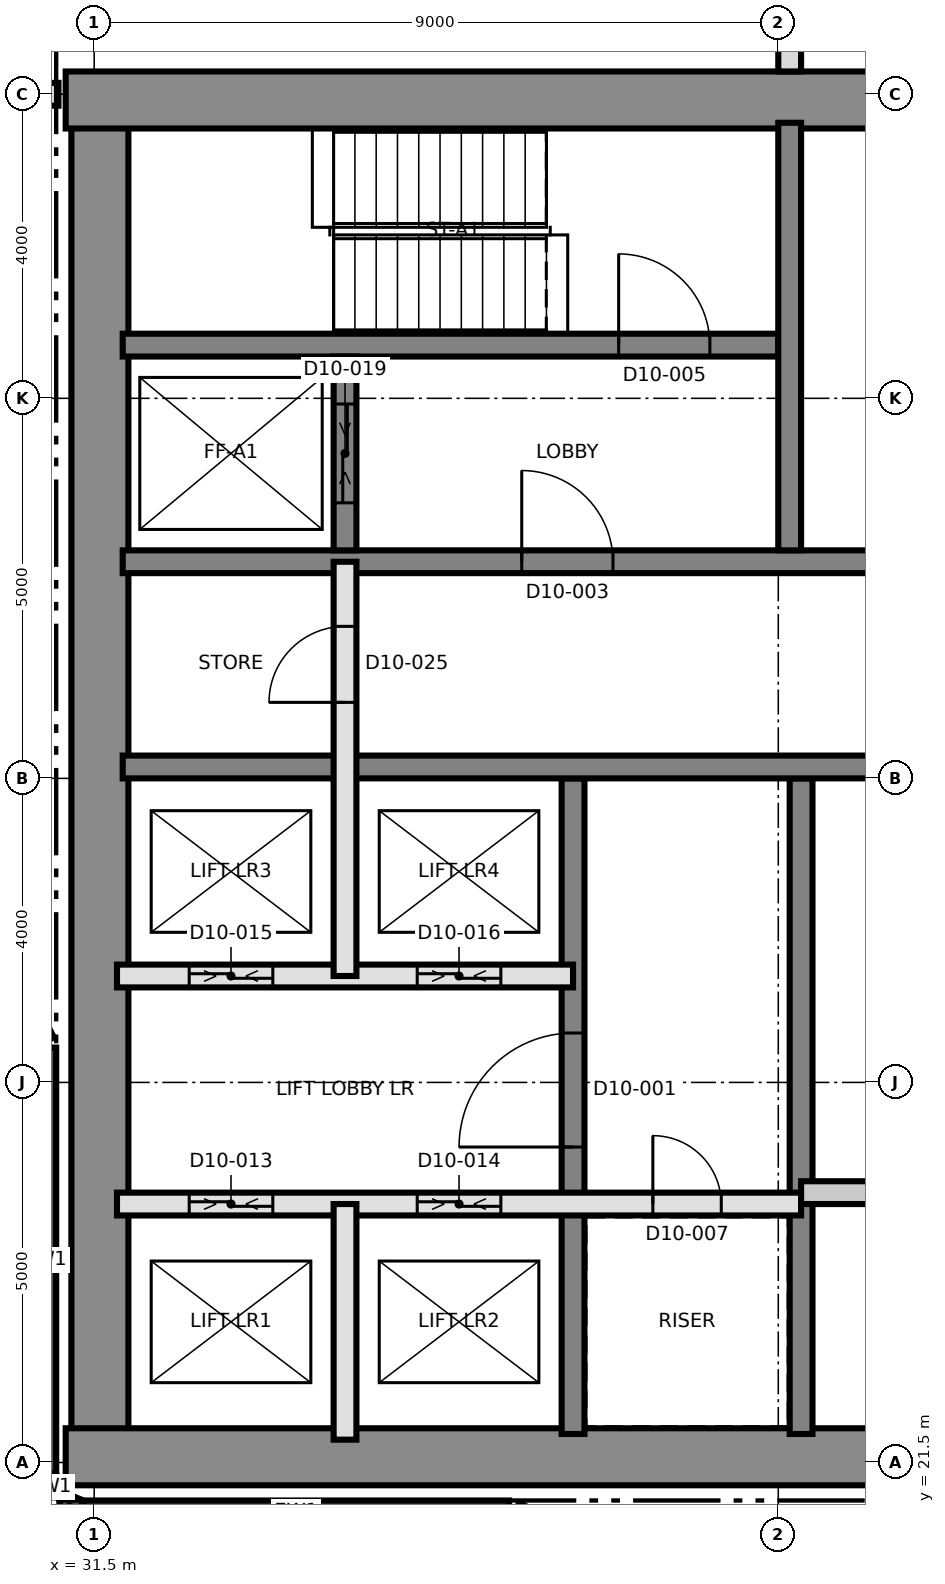
"""IFC4 building model, lengths in metres.
Left out: names, types, materials, properties, quantities, classifications, styles, units other than length and angle.
Written with IfcOpenShell. Run it as: python <this file> out.ifc"""

import sys

from ifc_helpers import new_model, si_unit, direction, frame, frame_2d, origin, place, context, subcontext, project, spatial, rectangle, extrude, element, fill, save


model = new_model("IFC4")
c1 = context("Model", 3, precision=1e-05, world=origin(), true_north=direction((0.0, 1.0)))
c2 = subcontext(c1, "Body", "Model", "MODEL_VIEW")
j1 = project(units=[si_unit("LENGTHUNIT", "METRE"), si_unit("PLANEANGLEUNIT", "RADIAN")], contexts=[c1])
p1 = place(None, origin())
s1 = spatial("IfcSite", under=j1, at=p1, CompositionType="ELEMENT")
p2 = place(p1, origin())
s2 = spatial("IfcBuilding", under=s1, at=p2, CompositionType="ELEMENT")
p3 = place(p2, frame((0.0, 0.0, 116.7)))
s3 = spatial("IfcBuildingStorey", under=s2, at=p3, CompositionType="ELEMENT", Elevation=116.7)
p4 = place(p3, frame((31.575, 21.875, 0.0), z_axis=(0.0, 0.0, 1.0), x_axis=(0.0, 1.0, 0.0)))
e1 = element("IfcWall", 1, at=p4, inside=s3, PredefinedType="SHEAR", context=c2, shape_type="SweptSolid", body=[
    extrude(rectangle(XDim=17.25, YDim=0.75, at=frame_2d((8.625, 0.0))), origin(), (0.0, 0.0, 1.0), 3.7),
])
p5 = place(p3, frame((31.125, 21.575, 0.0), z_axis=(0.0, 0.0, 1.0), x_axis=(1.0, 0.0, 0.0)))
e2 = element("IfcWall", 2, at=p5, inside=s3, PredefinedType="SHEAR", context=c2, shape_type="SweptSolid", body=[
    extrude(rectangle(XDim=27.0, YDim=0.75, at=frame_2d((13.5, 0.0))), origin(), (0.0, 0.0, 1.0), 3.7),
])
p6 = place(p3, frame((31.125, 39.425, 0.0), z_axis=(0.0, 0.0, 1.0), x_axis=(1.0, 0.0, 0.0)))
e3 = element("IfcWall", 3, at=p6, inside=s3, PredefinedType="SHEAR", context=c2, shape_type="SweptSolid", body=[
    extrude(rectangle(XDim=27.0, YDim=0.75, at=frame_2d((13.5, 0.0))), origin(), (0.0, 0.0, 1.0), 3.7),
])
p7 = place(p6, frame((10.575, 0.0, 0.0)))
e4 = element("IfcOpeningElement", 4, at=p7, cuts=e3, PredefinedType="OPENING", context=c2, shape_type="SweptSolid", body=[
    extrude(rectangle(XDim=1.2, YDim=2.1, at=frame_2d((0.6, 1.05))), frame((0.0, 0.385, 0.0), z_axis=(0.0, -1.0, 0.0), x_axis=(1.0, 0.0, 0.0)), (0.0, 0.0, 1.0), 0.77),
])
p8 = place(p3, frame((37.8, 21.875, 0.0), z_axis=(0.0, 0.0, 1.0), x_axis=(0.0, 1.0, 0.0)))
e5 = element("IfcWall", 5, at=p8, inside=s3, PredefinedType="SHEAR", context=c2, shape_type="SweptSolid", body=[
    extrude(rectangle(XDim=8.625, YDim=0.3, at=frame_2d((4.312, 0.0))), origin(), (0.0, 0.0, 1.0), 3.7),
])
p9 = place(p8, frame((3.775, 0.0, 0.0)))
e6 = element("IfcOpeningElement", 6, at=p9, cuts=e5, PredefinedType="OPENING", context=c2, shape_type="SweptSolid", body=[
    extrude(rectangle(XDim=1.5, YDim=2.1, at=frame_2d((0.75, 1.05))), frame((0.0, 0.16, 0.0), z_axis=(0.0, -1.0, 0.0), x_axis=(1.0, 0.0, 0.0)), (0.0, 0.0, 1.0), 0.32),
])
p10 = place(p3, frame((40.8, 21.875, 0.0), z_axis=(0.0, 0.0, 1.0), x_axis=(0.0, 1.0, 0.0)))
e7 = element("IfcWall", 7, at=p10, inside=s3, PredefinedType="SHEAR", context=c2, shape_type="SweptSolid", body=[
    extrude(rectangle(XDim=8.625, YDim=0.3, at=frame_2d((4.312, 0.0))), origin(), (0.0, 0.0, 1.0), 3.7),
])
p11 = place(p3, frame((31.875, 30.65, 0.0), z_axis=(0.0, 0.0, 1.0), x_axis=(1.0, 0.0, 0.0)))
e8 = element("IfcWall", 8, at=p11, inside=s3, PredefinedType="SHEAR", context=c2, shape_type="SweptSolid", body=[
    extrude(rectangle(XDim=26.25, YDim=0.3, at=frame_2d((13.125, 0.0))), origin(), (0.0, 0.0, 1.0), 3.7),
])
p12 = place(p11, frame((24.625, 0.0, 0.0)))
e9 = element("IfcOpeningElement", 9, at=p12, cuts=e8, PredefinedType="OPENING", context=c2, shape_type="SweptSolid", body=[
    extrude(rectangle(XDim=1.0, YDim=2.1, at=frame_2d((0.5, 1.05))), frame((0.0, 0.16, 0.0), z_axis=(0.0, -1.0, 0.0), x_axis=(1.0, 0.0, 0.0)), (0.0, 0.0, 1.0), 0.32),
])
p13 = place(p11, frame((11.425, 0.0, 0.0)))
e10 = element("IfcOpeningElement", 10, at=p13, cuts=e8, PredefinedType="OPENING", context=c2, shape_type="SweptSolid", body=[
    extrude(rectangle(XDim=1.0, YDim=2.1, at=frame_2d((0.5, 1.05))), frame((0.0, 0.16, 0.0), z_axis=(0.0, -1.0, 0.0), x_axis=(1.0, 0.0, 0.0)), (0.0, 0.0, 1.0), 0.32),
])
p14 = place(p3, frame((31.875, 33.35, 0.0), z_axis=(0.0, 0.0, 1.0), x_axis=(1.0, 0.0, 0.0)))
e11 = element("IfcWall", 11, at=p14, inside=s3, PredefinedType="SHEAR", context=c2, shape_type="SweptSolid", body=[
    extrude(rectangle(XDim=26.25, YDim=0.3, at=frame_2d((13.125, 0.0))), origin(), (0.0, 0.0, 1.0), 3.7),
])
p15 = place(p14, frame((13.775, 0.0, 0.0)))
e12 = element("IfcOpeningElement", 12, at=p15, cuts=e11, PredefinedType="OPENING", context=c2, shape_type="SweptSolid", body=[
    extrude(rectangle(XDim=1.4, YDim=2.1, at=frame_2d((0.7, 1.05))), frame((0.0, 0.16, 0.0), z_axis=(0.0, -1.0, 0.0), x_axis=(1.0, 0.0, 0.0)), (0.0, 0.0, 1.0), 0.32),
])
p16 = place(p14, frame((5.25, 0.0, 0.0)))
e13 = element("IfcOpeningElement", 13, at=p16, cuts=e11, PredefinedType="OPENING", context=c2, shape_type="SweptSolid", body=[
    extrude(rectangle(XDim=1.2, YDim=2.1, at=frame_2d((0.6, 1.05))), frame((0.0, 0.16, 0.0), z_axis=(0.0, -1.0, 0.0), x_axis=(1.0, 0.0, 0.0)), (0.0, 0.0, 1.0), 0.32),
])
p17 = place(p14, frame((19.8, 0.0, 0.0)))
e14 = element("IfcOpeningElement", 14, at=p17, cuts=e11, PredefinedType="OPENING", context=c2, shape_type="SweptSolid", body=[
    extrude(rectangle(XDim=1.2, YDim=2.1, at=frame_2d((0.6, 1.05))), frame((0.0, 0.16, 0.0), z_axis=(0.0, -1.0, 0.0), x_axis=(1.0, 0.0, 0.0)), (0.0, 0.0, 1.0), 0.32),
])
p18 = place(p3, frame((31.875, 36.2, 0.0), z_axis=(0.0, 0.0, 1.0), x_axis=(1.0, 0.0, 0.0)))
e15 = element("IfcWall", 15, at=p18, inside=s3, PredefinedType="SHEAR", context=c2, shape_type="SweptSolid", body=[
    extrude(rectangle(XDim=8.625, YDim=0.3, at=frame_2d((4.312, 0.0))), origin(), (0.0, 0.0, 1.0), 3.7),
])
p19 = place(p18, frame((6.525, 0.0, 0.0)))
e16 = element("IfcOpeningElement", 16, at=p19, cuts=e15, PredefinedType="OPENING", context=c2, shape_type="SweptSolid", body=[
    extrude(rectangle(XDim=1.2, YDim=2.1, at=frame_2d((0.6, 1.05))), frame((0.0, 0.16, 0.0), z_axis=(0.0, -1.0, 0.0), x_axis=(1.0, 0.0, 0.0)), (0.0, 0.0, 1.0), 0.32),
])
p20 = place(p3, frame((40.65, 33.5, 0.0), z_axis=(0.0, 0.0, 1.0), x_axis=(0.0, 1.0, 0.0)))
e17 = element("IfcWall", 17, at=p20, inside=s3, PredefinedType="SHEAR", context=c2, shape_type="SweptSolid", body=[
    extrude(rectangle(XDim=5.625, YDim=0.3, at=frame_2d((2.812, 0.0))), origin(), (0.0, 0.0, 1.0), 3.7),
])
p21 = place(p3, frame((34.8, 33.5, 0.0), z_axis=(0.0, 0.0, 1.0), x_axis=(0.0, 1.0, 0.0)))
e18 = element("IfcWall", 18, at=p21, inside=s3, PredefinedType="SHEAR", context=c2, shape_type="SweptSolid", body=[
    extrude(rectangle(XDim=2.55, YDim=0.3, at=frame_2d((1.275, 0.0))), origin(), (0.0, 0.0, 1.0), 3.7),
])
p22 = place(p21, frame((0.625, 0.0, 0.0)))
e19 = element("IfcOpeningElement", 19, at=p22, cuts=e18, PredefinedType="OPENING", context=c2, shape_type="SweptSolid", body=[
    extrude(rectangle(XDim=1.3, YDim=2.4, at=frame_2d((0.65, 1.2))), frame((0.0, 0.16, 0.0), z_axis=(0.0, -1.0, 0.0), x_axis=(1.0, 0.0, 0.0)), (0.0, 0.0, 1.0), 0.32),
])
p23 = place(p3, frame((30.85, 26.959, 0.0), z_axis=(0.0, 0.0, 1.0), x_axis=(0.0, -1.0, 0.0)))
e20 = element("IfcWall", 20, at=p23, inside=s3, PredefinedType="SOLIDWALL", context=c2, shape_type="SweptSolid", body=[
    extrude(rectangle(XDim=5.599, YDim=0.3, at=frame_2d((2.8, 0.0))), origin(), (0.0, 0.0, 1.0), 3.4),
])
for number, where, z_axis, x_axis in (
    (21, (30.861, 21.302, 0.0), (0.0, 0.0, 1.0), (0.383, -0.924, 0.0)),
    (22, (31.048, 20.967, 0.0), (0.0, 0.0, 1.0), (0.924, -0.383, 0.0)),
):
    element("IfcWall", number, at=place(p3, frame(where, z_axis=z_axis, x_axis=x_axis)), inside=s3, PredefinedType="SOLIDWALL", context=c2, shape_type="SweptSolid", body=[
        extrude(rectangle(XDim=0.275, YDim=0.3, at=frame_2d((0.138, 0.0))), origin(), (0.0, 0.0, 1.0), 3.4),
    ])
p24 = place(p3, frame((31.36, 20.85, 0.0), z_axis=(0.0, 0.0, 1.0), x_axis=(1.0, 0.0, 0.0)))
e23 = element("IfcWall", 23, at=p24, inside=s3, PredefinedType="SOLIDWALL", context=c2, shape_type="SweptSolid", body=[
    extrude(rectangle(XDim=5.599, YDim=0.3, at=frame_2d((2.8, 0.0))), origin(), (0.0, 0.0, 1.0), 3.4),
])
for number, where, z_axis, x_axis in (
    (24, (37.025, 20.834, 0.0), (0.0, 0.0, 1.0), (0.897, -0.442, 0.0)),
    (25, (30.216, 28.28, 0.0), (0.0, 0.0, 1.0), (0.442, -0.897, 0.0)),
):
    element("IfcWall", number, at=place(p3, frame(where, z_axis=z_axis, x_axis=x_axis)), inside=s3, PredefinedType="SOLIDWALL", context=c2, shape_type="SweptSolid", body=[
        extrude(rectangle(XDim=1.399, YDim=0.3, at=frame_2d((0.7, 0.0))), origin(), (0.0, 0.0, 1.0), 3.4),
    ])
p25 = place(p3, frame((31.8, 24.9, 0.0), z_axis=(0.0, 0.0, 1.0), x_axis=(1.0, 0.0, 0.0)))
e26 = element("IfcWall", 26, at=p25, inside=s3, PredefinedType="SOLIDWALL", context=c2, shape_type="SweptSolid", body=[
    extrude(rectangle(XDim=9.0, YDim=0.3, at=frame_2d((4.5, 0.0))), origin(), (0.0, 0.0, 1.0), 3.4),
])
p26 = place(p25, frame((7.05, 0.0, 0.0)))
e27 = element("IfcOpeningElement", 27, at=p26, cuts=e26, PredefinedType="OPENING", context=c2, shape_type="SweptSolid", body=[
    extrude(rectangle(XDim=0.9, YDim=2.1, at=frame_2d((0.45, 1.05))), frame((0.0, 0.16, 0.0), z_axis=(0.0, -1.0, 0.0), x_axis=(1.0, 0.0, 0.0)), (0.0, 0.0, 1.0), 0.32),
])
p27 = place(p25, frame((0.95, 0.0, 0.0)))
e28 = element("IfcOpeningElement", 28, at=p27, cuts=e26, PredefinedType="OPENING", context=c2, shape_type="SweptSolid", body=[
    extrude(rectangle(XDim=1.1, YDim=2.4, at=frame_2d((0.55, 1.2))), frame((0.0, 0.16, 0.0), z_axis=(0.0, -1.0, 0.0), x_axis=(1.0, 0.0, 0.0)), (0.0, 0.0, 1.0), 0.32),
])
p28 = place(p25, frame((3.95, 0.0, 0.0)))
e29 = element("IfcOpeningElement", 29, at=p28, cuts=e26, PredefinedType="OPENING", context=c2, shape_type="SweptSolid", body=[
    extrude(rectangle(XDim=1.1, YDim=2.4, at=frame_2d((0.55, 1.2))), frame((0.0, 0.16, 0.0), z_axis=(0.0, -1.0, 0.0), x_axis=(1.0, 0.0, 0.0)), (0.0, 0.0, 1.0), 0.32),
])
p29 = place(p3, frame((40.8, 25.05, 0.0), z_axis=(0.0, 0.0, 1.0), x_axis=(1.0, 0.0, 0.0)))
e30 = element("IfcWall", 30, at=p29, inside=s3, PredefinedType="PARTITIONING", context=c2, shape_type="SweptSolid", body=[
    extrude(rectangle(XDim=6.0, YDim=0.3, at=frame_2d((3.0, 0.0))), origin(), (0.0, 0.0, 1.0), 3.4),
])
p30 = place(p29, frame((2.5, 0.0, 0.0)))
e31 = element("IfcOpeningElement", 31, at=p30, cuts=e30, PredefinedType="OPENING", context=c2, shape_type="SweptSolid", body=[
    extrude(rectangle(XDim=1.0, YDim=2.1, at=frame_2d((0.5, 1.05))), frame((0.0, 0.16, 0.0), z_axis=(0.0, -1.0, 0.0), x_axis=(1.0, 0.0, 0.0)), (0.0, 0.0, 1.0), 0.32),
])
p31 = place(p3, frame((31.8, 27.9, 0.0), z_axis=(0.0, 0.0, 1.0), x_axis=(1.0, 0.0, 0.0)))
e32 = element("IfcWall", 32, at=p31, inside=s3, PredefinedType="SOLIDWALL", context=c2, shape_type="SweptSolid", body=[
    extrude(rectangle(XDim=6.0, YDim=0.3, at=frame_2d((3.0, 0.0))), origin(), (0.0, 0.0, 1.0), 3.4),
])
p32 = place(p31, frame((0.95, 0.0, 0.0)))
e33 = element("IfcOpeningElement", 33, at=p32, cuts=e32, PredefinedType="OPENING", context=c2, shape_type="SweptSolid", body=[
    extrude(rectangle(XDim=1.1, YDim=2.4, at=frame_2d((0.55, 1.2))), frame((0.0, 0.16, 0.0), z_axis=(0.0, -1.0, 0.0), x_axis=(1.0, 0.0, 0.0)), (0.0, 0.0, 1.0), 0.32),
])
p33 = place(p31, frame((3.95, 0.0, 0.0)))
e34 = element("IfcOpeningElement", 34, at=p33, cuts=e32, PredefinedType="OPENING", context=c2, shape_type="SweptSolid", body=[
    extrude(rectangle(XDim=1.1, YDim=2.4, at=frame_2d((0.55, 1.2))), frame((0.0, 0.16, 0.0), z_axis=(0.0, -1.0, 0.0), x_axis=(1.0, 0.0, 0.0)), (0.0, 0.0, 1.0), 0.32),
])
p34 = place(p3, frame((34.8, 21.8, 0.0), z_axis=(0.0, 0.0, 1.0), x_axis=(0.0, 1.0, 0.0)))
e35 = element("IfcWall", 35, at=p34, inside=s3, PredefinedType="SOLIDWALL", context=c2, shape_type="SweptSolid", body=[
    extrude(rectangle(XDim=3.1, YDim=0.3, at=frame_2d((1.55, 0.0))), origin(), (0.0, 0.0, 1.0), 3.4),
])
p35 = place(p3, frame((34.8, 27.9, 0.0), z_axis=(0.0, 0.0, 1.0), x_axis=(0.0, 1.0, 0.0)))
e36 = element("IfcWall", 36, at=p35, inside=s3, PredefinedType="SOLIDWALL", context=c2, shape_type="SweptSolid", body=[
    extrude(rectangle(XDim=5.45, YDim=0.3, at=frame_2d((2.725, 0.0))), origin(), (0.0, 0.0, 1.0), 3.4),
])
p36 = place(p35, frame((3.6, 0.0, 0.0)))
e37 = element("IfcOpeningElement", 37, at=p36, cuts=e36, PredefinedType="OPENING", context=c2, shape_type="SweptSolid", body=[
    extrude(rectangle(XDim=1.0, YDim=2.1, at=frame_2d((0.5, 1.05))), frame((0.0, 0.16, 0.0), z_axis=(0.0, -1.0, 0.0), x_axis=(1.0, 0.0, 0.0)), (0.0, 0.0, 1.0), 0.32),
])
p37 = place(p3, frame((29.275, 39.5, 0.0), z_axis=(0.0, 0.0, 1.0), x_axis=(1.0, 0.0, 0.0)))
e38 = element("IfcWall", 38, at=p37, inside=s3, PredefinedType="PARTITIONING", context=c2, shape_type="SweptSolid", body=[
    extrude(rectangle(XDim=1.755, YDim=0.3, at=frame_2d((0.877, 0.0))), origin(), (0.0, 0.0, 1.0), 3.4),
])
p38 = place(p3, frame((40.65, 39.8, 0.0), z_axis=(0.0, 0.0, 1.0), x_axis=(0.0, 1.0, 0.0)))
e39 = element("IfcWall", 39, at=p38, inside=s3, PredefinedType="PARTITIONING", context=c2, shape_type="SweptSolid", body=[
    extrude(rectangle(XDim=37.2, YDim=0.3, at=frame_2d((18.6, 0.0))), origin(), (0.0, 0.0, 1.0), 3.4),
])
p39 = place(p38, frame((0.835, 0.0, 0.0)))
e40 = element("IfcOpeningElement", 40, at=p39, cuts=e39, PredefinedType="OPENING", context=c2, shape_type="SweptSolid", body=[
    extrude(rectangle(XDim=1.2, YDim=2.1, at=frame_2d((0.6, 1.05))), frame((0.0, 0.16, 0.0), z_axis=(0.0, -1.0, 0.0), x_axis=(1.0, 0.0, 0.0)), (0.0, 0.0, 1.0), 0.32),
])
p40 = place(p38, frame((4.085, 0.0, 0.0)))
e41 = element("IfcOpeningElement", 41, at=p40, cuts=e39, PredefinedType="OPENING", context=c2, shape_type="SweptSolid", body=[
    extrude(rectangle(XDim=1.0, YDim=2.1, at=frame_2d((0.5, 1.05))), frame((0.0, 0.16, 0.0), z_axis=(0.0, -1.0, 0.0), x_axis=(1.0, 0.0, 0.0)), (0.0, 0.0, 1.0), 0.32),
])
p41 = place(p38, frame((9.835, 0.0, 0.0)))
e42 = element("IfcOpeningElement", 42, at=p41, cuts=e39, PredefinedType="OPENING", context=c2, shape_type="SweptSolid", body=[
    extrude(rectangle(XDim=1.2, YDim=2.1, at=frame_2d((0.6, 1.05))), frame((0.0, 0.16, 0.0), z_axis=(0.0, -1.0, 0.0), x_axis=(1.0, 0.0, 0.0)), (0.0, 0.0, 1.0), 0.32),
])
p42 = place(p38, frame((13.085, 0.0, 0.0)))
e43 = element("IfcOpeningElement", 43, at=p42, cuts=e39, PredefinedType="OPENING", context=c2, shape_type="SweptSolid", body=[
    extrude(rectangle(XDim=1.0, YDim=2.1, at=frame_2d((0.5, 1.05))), frame((0.0, 0.16, 0.0), z_axis=(0.0, -1.0, 0.0), x_axis=(1.0, 0.0, 0.0)), (0.0, 0.0, 1.0), 0.32),
])
p43 = place(p38, frame((21.2, 0.0, 0.0)))
e44 = element("IfcOpeningElement", 44, at=p43, cuts=e39, PredefinedType="OPENING", context=c2, shape_type="SweptSolid", body=[
    extrude(rectangle(XDim=1.0, YDim=2.4, at=frame_2d((0.5, 1.2))), frame((0.0, 0.16, 0.0), z_axis=(0.0, -1.0, 0.0), x_axis=(1.0, 0.0, 0.0)), (0.0, 0.0, 1.0), 0.32),
])
p44 = place(p9, origin())
e45 = element("IfcDoor", 45, at=p44, inside=s3, OperationType="SINGLE_SWING_LEFT", PredefinedType="DOOR", context=c2, shape_type="SweptSolid", body=[
    extrude(rectangle(XDim=1.5, YDim=2.1, at=frame_2d((0.75, 1.05))), frame((0.0, 0.025, 0.0), z_axis=(0.0, -1.0, 0.0), x_axis=(1.0, 0.0, 0.0)), (0.0, 0.0, 1.0), 0.05),
])
fill(e6, e45)
p45 = place(p16, origin())
e46 = element("IfcDoor", 46, at=p45, inside=s3, OperationType="SINGLE_SWING_LEFT", PredefinedType="DOOR", context=c2, shape_type="SweptSolid", body=[
    extrude(rectangle(XDim=1.2, YDim=2.1, at=frame_2d((0.6, 1.05))), frame((0.0, 0.025, 0.0), z_axis=(0.0, -1.0, 0.0), x_axis=(1.0, 0.0, 0.0)), (0.0, 0.0, 1.0), 0.05),
])
fill(e13, e46)
p46 = place(p19, origin())
e47 = element("IfcDoor", 47, at=p46, inside=s3, OperationType="SINGLE_SWING_RIGHT", PredefinedType="DOOR", context=c2, shape_type="SweptSolid", body=[
    extrude(rectangle(XDim=1.2, YDim=2.1, at=frame_2d((0.6, 1.05))), frame((0.0, 0.025, 0.0), z_axis=(0.0, -1.0, 0.0), x_axis=(1.0, 0.0, 0.0)), (0.0, 0.0, 1.0), 0.05),
])
fill(e16, e47)
p47 = place(p26, origin())
e48 = element("IfcDoor", 48, at=p47, inside=s3, OperationType="SINGLE_SWING_LEFT", PredefinedType="DOOR", context=c2, shape_type="SweptSolid", body=[
    extrude(rectangle(XDim=0.9, YDim=2.1, at=frame_2d((0.45, 1.05))), frame((0.0, 0.025, 0.0), z_axis=(0.0, -1.0, 0.0), x_axis=(1.0, 0.0, 0.0)), (0.0, 0.0, 1.0), 0.05),
])
fill(e27, e48)
p48 = place(p27, origin())
e49 = element("IfcDoor", 49, at=p48, inside=s3, OperationType="SLIDING_TO_LEFT", PredefinedType="DOOR", context=c2, shape_type="SweptSolid", body=[
    extrude(rectangle(XDim=1.1, YDim=2.4, at=frame_2d((0.55, 1.2))), frame((0.0, 0.025, 0.0), z_axis=(0.0, -1.0, 0.0), x_axis=(1.0, 0.0, 0.0)), (0.0, 0.0, 1.0), 0.05),
])
fill(e28, e49)
p49 = place(p28, origin())
e50 = element("IfcDoor", 50, at=p49, inside=s3, OperationType="SLIDING_TO_LEFT", PredefinedType="DOOR", context=c2, shape_type="SweptSolid", body=[
    extrude(rectangle(XDim=1.1, YDim=2.4, at=frame_2d((0.55, 1.2))), frame((0.0, 0.025, 0.0), z_axis=(0.0, -1.0, 0.0), x_axis=(1.0, 0.0, 0.0)), (0.0, 0.0, 1.0), 0.05),
])
fill(e29, e50)
p50 = place(p32, origin())
e51 = element("IfcDoor", 51, at=p50, inside=s3, OperationType="SLIDING_TO_LEFT", PredefinedType="DOOR", context=c2, shape_type="SweptSolid", body=[
    extrude(rectangle(XDim=1.1, YDim=2.4, at=frame_2d((0.55, 1.2))), frame((0.0, 0.025, 0.0), z_axis=(0.0, -1.0, 0.0), x_axis=(1.0, 0.0, 0.0)), (0.0, 0.0, 1.0), 0.05),
])
fill(e33, e51)
p51 = place(p33, origin())
e52 = element("IfcDoor", 52, at=p51, inside=s3, OperationType="SLIDING_TO_LEFT", PredefinedType="DOOR", context=c2, shape_type="SweptSolid", body=[
    extrude(rectangle(XDim=1.1, YDim=2.4, at=frame_2d((0.55, 1.2))), frame((0.0, 0.025, 0.0), z_axis=(0.0, -1.0, 0.0), x_axis=(1.0, 0.0, 0.0)), (0.0, 0.0, 1.0), 0.05),
])
fill(e34, e52)
p52 = place(p22, origin())
e53 = element("IfcDoor", 53, at=p52, inside=s3, OperationType="SLIDING_TO_LEFT", PredefinedType="DOOR", context=c2, shape_type="SweptSolid", body=[
    extrude(rectangle(XDim=1.3, YDim=2.4, at=frame_2d((0.65, 1.2))), frame((0.0, 0.025, 0.0), z_axis=(0.0, -1.0, 0.0), x_axis=(1.0, 0.0, 0.0)), (0.0, 0.0, 1.0), 0.05),
])
fill(e19, e53)
p53 = place(p36, origin())
e54 = element("IfcDoor", 54, at=p53, inside=s3, OperationType="SINGLE_SWING_LEFT", PredefinedType="DOOR", context=c2, shape_type="SweptSolid", body=[
    extrude(rectangle(XDim=1.0, YDim=2.1, at=frame_2d((0.5, 1.05))), frame((0.0, 0.025, 0.0), z_axis=(0.0, -1.0, 0.0), x_axis=(1.0, 0.0, 0.0)), (0.0, 0.0, 1.0), 0.05),
])
fill(e37, e54)
save(model, sys.argv[1])
